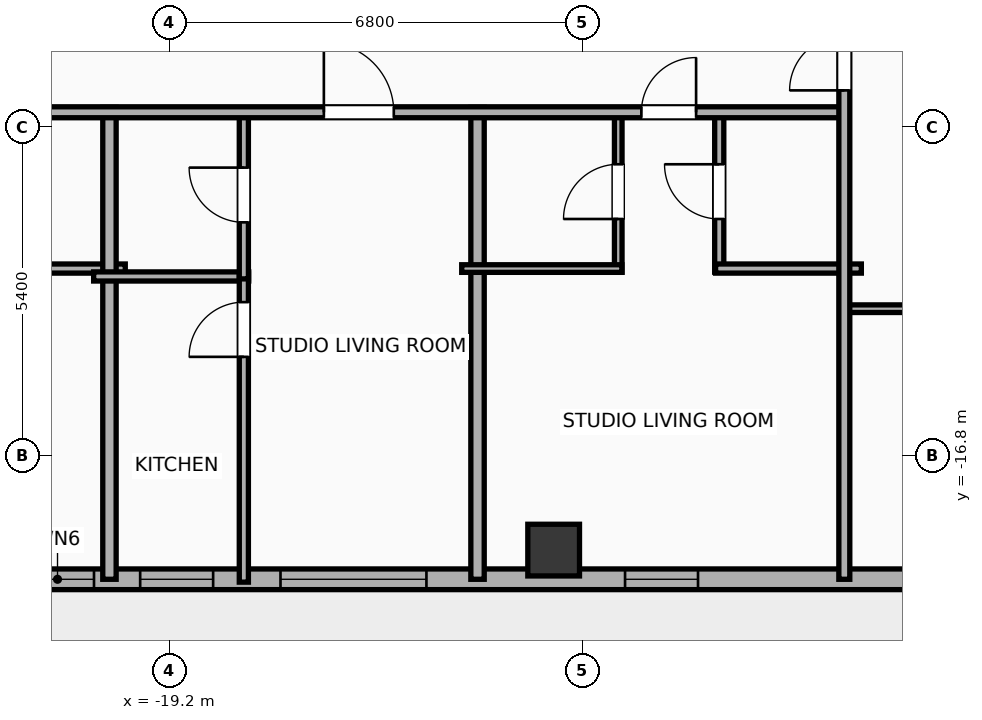
"""IFC4 building model, lengths in metres.
Left out: names, types, materials, properties, quantities, classifications, styles, units other than length and angle.
Written with IfcOpenShell. Run it as: python <this file> out.ifc"""

import sys

from ifc_helpers import new_model, si_unit, direction, frame, frame_2d, origin, origin_2d, place, context, subcontext, project, spatial, rectangle, hollow_rectangle, extrude, element, fill, save


model = new_model("IFC4")
c1 = context("Model", 3, precision=1e-05, world=origin(), true_north=direction((0.0, 1.0)))
c2 = subcontext(c1, "Body", "Model", "MODEL_VIEW")
j1 = project(units=[si_unit("LENGTHUNIT", "METRE"), si_unit("PLANEANGLEUNIT", "RADIAN")], contexts=[c1])
p1 = place(None, origin())
s1 = spatial("IfcSite", under=j1, at=p1, CompositionType="ELEMENT")
p2 = place(p1, origin())
s2 = spatial("IfcBuilding", under=s1, at=p2, CompositionType="ELEMENT")
p3 = place(p2, frame((0.0, 0.0, 231.4)))
s3 = spatial("IfcBuildingStorey", under=s2, at=p3, CompositionType="ELEMENT", Elevation=231.4)
p4 = place(p3, frame((-12.88, -18.35, 0.0), z_axis=(0.0, 0.0, 1.0), x_axis=(1.0, 0.0, 0.0)))
e1 = element("IfcColumn", 1, at=p4, inside=s3, PredefinedType="COLUMN", context=c2, shape_type="SweptSolid", body=[
    extrude(hollow_rectangle(XDim=0.85, YDim=0.85, WallThickness=0.028, at=origin_2d()), origin(), (0.0, 0.0, 1.0), 3.9),
])
p5 = place(p3, frame((26.783, -18.83, 0.0), z_axis=(0.0, 0.0, 1.0), x_axis=(-1.0, 0.0, 0.0)))
e2 = element("IfcWall", 2, at=p5, inside=s3, PredefinedType="ELEMENTEDWALL", context=c2, shape_type="SweptSolid", body=[
    extrude(rectangle(XDim=49.566, YDim=0.34, at=frame_2d((24.783, 0.0))), origin(), (0.0, 0.0, 1.0), 3.65),
])
p6 = place(p5, frame((23.583, 0.0, 0.75)))
e3 = element("IfcOpeningElement", 3, at=p6, cuts=e2, PredefinedType="OPENING", context=c2, shape_type="SweptSolid", body=[
    extrude(rectangle(XDim=2.4, YDim=2.1, at=frame_2d((1.2, 1.05))), frame((0.0, 0.18, 0.0), z_axis=(0.0, -1.0, 0.0), x_axis=(1.0, 0.0, 0.0)), (0.0, 0.0, 1.0), 0.36),
])
p7 = place(p5, frame((41.756, 0.0, 0.75)))
e4 = element("IfcOpeningElement", 4, at=p7, cuts=e2, PredefinedType="OPENING", context=c2, shape_type="SweptSolid", body=[
    extrude(rectangle(XDim=2.4, YDim=2.1, at=frame_2d((1.2, 1.05))), frame((0.0, 0.18, 0.0), z_axis=(0.0, -1.0, 0.0), x_axis=(1.0, 0.0, 0.0)), (0.0, 0.0, 1.0), 0.36),
])
p8 = place(p5, frame((47.222, 0.0, 0.75)))
e5 = element("IfcOpeningElement", 5, at=p8, cuts=e2, PredefinedType="OPENING", context=c2, shape_type="SweptSolid", body=[
    extrude(rectangle(XDim=1.2, YDim=2.05, at=frame_2d((0.6, 1.025))), frame((0.0, 0.18, 0.0), z_axis=(0.0, -1.0, 0.0), x_axis=(1.0, 0.0, 0.0)), (0.0, 0.0, 1.0), 0.36),
])
p9 = place(p5, frame((45.263, 0.0, 0.75)))
e6 = element("IfcOpeningElement", 6, at=p9, cuts=e2, PredefinedType="OPENING", context=c2, shape_type="SweptSolid", body=[
    extrude(rectangle(XDim=1.2, YDim=2.05, at=frame_2d((0.6, 1.025))), frame((0.0, 0.18, 0.0), z_axis=(0.0, -1.0, 0.0), x_axis=(1.0, 0.0, 0.0)), (0.0, 0.0, 1.0), 0.36),
])
p10 = place(p5, frame((37.289, 0.0, 0.75)))
e7 = element("IfcOpeningElement", 7, at=p10, cuts=e2, PredefinedType="OPENING", context=c2, shape_type="SweptSolid", body=[
    extrude(rectangle(XDim=1.2, YDim=2.05, at=frame_2d((0.6, 1.025))), frame((0.0, 0.18, 0.0), z_axis=(0.0, -1.0, 0.0), x_axis=(1.0, 0.0, 0.0)), (0.0, 0.0, 1.0), 0.36),
])
p11 = place(p5, frame((16.115, 0.0, 0.75)))
e8 = element("IfcOpeningElement", 8, at=p11, cuts=e2, PredefinedType="OPENING", context=c2, shape_type="SweptSolid", body=[
    extrude(rectangle(XDim=1.2, YDim=2.05, at=frame_2d((0.6, 1.025))), frame((0.0, 0.18, 0.0), z_axis=(0.0, -1.0, 0.0), x_axis=(1.0, 0.0, 0.0)), (0.0, 0.0, 1.0), 0.36),
])
p12 = place(p5, frame((12.422, 0.0, 0.75)))
e9 = element("IfcOpeningElement", 9, at=p12, cuts=e2, PredefinedType="OPENING", context=c2, shape_type="SweptSolid", body=[
    extrude(rectangle(XDim=1.2, YDim=2.05, at=frame_2d((0.6, 1.025))), frame((0.0, 0.18, 0.0), z_axis=(0.0, -1.0, 0.0), x_axis=(1.0, 0.0, 0.0)), (0.0, 0.0, 1.0), 0.36),
])
p13 = place(p5, frame((8.01, 0.0, 0.75)))
e10 = element("IfcOpeningElement", 10, at=p13, cuts=e2, PredefinedType="OPENING", context=c2, shape_type="SweptSolid", body=[
    extrude(rectangle(XDim=1.2, YDim=2.05, at=frame_2d((0.6, 1.025))), frame((0.0, 0.18, 0.0), z_axis=(0.0, -1.0, 0.0), x_axis=(1.0, 0.0, 0.0)), (0.0, 0.0, 1.0), 0.36),
])
p14 = place(p5, frame((5.037, 0.0, 0.75)))
e11 = element("IfcOpeningElement", 11, at=p14, cuts=e2, PredefinedType="OPENING", context=c2, shape_type="SweptSolid", body=[
    extrude(rectangle(XDim=1.2, YDim=2.05, at=frame_2d((0.6, 1.025))), frame((0.0, 0.18, 0.0), z_axis=(0.0, -1.0, 0.0), x_axis=(1.0, 0.0, 0.0)), (0.0, 0.0, 1.0), 0.36),
])
p15 = place(p5, frame((1.811, 0.0, 0.75)))
e12 = element("IfcOpeningElement", 12, at=p15, cuts=e2, PredefinedType="OPENING", context=c2, shape_type="SweptSolid", body=[
    extrude(rectangle(XDim=1.2, YDim=2.05, at=frame_2d((0.6, 1.025))), frame((0.0, 0.18, 0.0), z_axis=(0.0, -1.0, 0.0), x_axis=(1.0, 0.0, 0.0)), (0.0, 0.0, 1.0), 0.36),
])
p16 = place(p5, frame((32.253, 0.0, 0.75)))
e13 = element("IfcOpeningElement", 13, at=p16, cuts=e2, PredefinedType="OPENING", context=c2, shape_type="SweptSolid", body=[
    extrude(rectangle(XDim=1.2, YDim=2.05, at=frame_2d((0.6, 1.025))), frame((0.0, 0.18, 0.0), z_axis=(0.0, -1.0, 0.0), x_axis=(1.0, 0.0, 0.0)), (0.0, 0.0, 1.0), 0.36),
])
p17 = place(p5, frame((27.853, 0.0, 0.75)))
e14 = element("IfcOpeningElement", 14, at=p17, cuts=e2, PredefinedType="OPENING", context=c2, shape_type="SweptSolid", body=[
    extrude(rectangle(XDim=1.2, YDim=2.05, at=frame_2d((0.6, 1.025))), frame((0.0, 0.18, 0.0), z_axis=(0.0, -1.0, 0.0), x_axis=(1.0, 0.0, 0.0)), (0.0, 0.0, 1.0), 0.36),
])
p18 = place(p5, frame((20.473, 0.0, 0.75)))
e15 = element("IfcOpeningElement", 15, at=p18, cuts=e2, PredefinedType="OPENING", context=c2, shape_type="SweptSolid", body=[
    extrude(rectangle(XDim=1.2, YDim=2.05, at=frame_2d((0.6, 1.025))), frame((0.0, 0.18, 0.0), z_axis=(0.0, -1.0, 0.0), x_axis=(1.0, 0.0, 0.0)), (0.0, 0.0, 1.0), 0.36),
])
p19 = place(p3, frame((-22.342, -13.72, 0.0), z_axis=(0.0, 0.0, 1.0), x_axis=(1.0, 0.0, 0.0)))
e16 = element("IfcWall", 16, at=p19, inside=s3, PredefinedType="PLUMBINGWALL", context=c2, shape_type="SweptSolid", body=[
    extrude(rectangle(XDim=2.417, YDim=0.15, at=frame_2d((1.208, 0.0))), origin(), (0.0, 0.0, 1.0), 3.65),
])
p20 = place(p3, frame((-20.185, -18.83, 0.0), z_axis=(0.0, 0.0, 1.0), x_axis=(0.0, 1.0, 0.0)))
e17 = element("IfcWall", 17, at=p20, inside=s3, PredefinedType="PARTITIONING", context=c2, shape_type="SweptSolid", body=[
    extrude(rectangle(XDim=7.76, YDim=0.22, at=frame_2d((3.88, 0.0))), origin(), (0.0, 0.0, 1.0), 3.65),
])
p21 = place(p3, frame((-20.445, -13.85, 0.0), z_axis=(0.0, 0.0, 1.0), x_axis=(1.0, 0.0, 0.0)))
e18 = element("IfcWall", 18, at=p21, inside=s3, PredefinedType="PLUMBINGWALL", context=c2, shape_type="SweptSolid", body=[
    extrude(rectangle(XDim=2.55, YDim=0.15, at=frame_2d((1.275, 0.0))), origin(), (0.0, 0.0, 1.0), 3.65),
])
p22 = place(p3, frame((-17.975, -18.877, 0.0), z_axis=(0.0, 0.0, 1.0), x_axis=(0.0, 1.0, 0.0)))
e19 = element("IfcWall", 19, at=p22, inside=s3, PredefinedType="PLUMBINGWALL", context=c2, shape_type="SweptSolid", body=[
    extrude(rectangle(XDim=5.067, YDim=0.15, at=frame_2d((2.533, 0.0))), origin(), (0.0, 0.0, 1.0), 3.65),
])
p23 = place(p22, frame((3.705, 0.0, 0.0)))
e20 = element("IfcOpeningElement", 20, at=p23, cuts=e19, PredefinedType="OPENING", context=c2, shape_type="SweptSolid", body=[
    extrude(rectangle(XDim=0.9, YDim=2.05, at=frame_2d((0.45, 1.025))), frame((0.0, 0.085, 0.0), z_axis=(0.0, -1.0, 0.0), x_axis=(1.0, 0.0, 0.0)), (0.0, 0.0, 1.0), 0.17),
])
p24 = place(p3, frame((-17.975, -13.89, 0.0), z_axis=(0.0, 0.0, 1.0), x_axis=(0.0, 1.0, 0.0)))
e21 = element("IfcWall", 21, at=p24, inside=s3, PredefinedType="PLUMBINGWALL", context=c2, shape_type="SweptSolid", body=[
    extrude(rectangle(XDim=2.76, YDim=0.15, at=frame_2d((1.38, 0.0))), origin(), (0.0, 0.0, 1.0), 3.65),
])
p25 = place(p24, frame((0.93, 0.0, 0.0)))
e22 = element("IfcOpeningElement", 22, at=p25, cuts=e21, PredefinedType="OPENING", context=c2, shape_type="SweptSolid", body=[
    extrude(rectangle(XDim=0.9, YDim=2.05, at=frame_2d((0.45, 1.025))), frame((0.0, 0.085, 0.0), z_axis=(0.0, -1.0, 0.0), x_axis=(1.0, 0.0, 0.0)), (0.0, 0.0, 1.0), 0.17),
])
p26 = place(p3, frame((-14.132, -18.83, 0.0), z_axis=(0.0, 0.0, 1.0), x_axis=(0.0, 1.0, 0.0)))
e23 = element("IfcWall", 23, at=p26, inside=s3, PredefinedType="PARTITIONING", context=c2, shape_type="SweptSolid", body=[
    extrude(rectangle(XDim=7.76, YDim=0.22, at=frame_2d((3.88, 0.0))), origin(), (0.0, 0.0, 1.0), 3.65),
])
p27 = place(p3, frame((-11.818, -13.78, 0.0), z_axis=(0.0, 0.0, 1.0), x_axis=(0.0, 1.0, 0.0)))
e24 = element("IfcWall", 24, at=p27, inside=s3, PredefinedType="PARTITIONING", context=c2, shape_type="SweptSolid", body=[
    extrude(rectangle(XDim=2.65, YDim=0.125, at=frame_2d((1.325, 0.0))), origin(), (0.0, 0.0, 1.0), 3.65),
])
p28 = place(p27, frame((0.875, 0.0, 0.0)))
e25 = element("IfcOpeningElement", 25, at=p28, cuts=e24, PredefinedType="OPENING", context=c2, shape_type="SweptSolid", body=[
    extrude(rectangle(XDim=0.9, YDim=2.05, at=frame_2d((0.45, 1.025))), frame((0.0, 0.073, 0.0), z_axis=(0.0, -1.0, 0.0), x_axis=(1.0, 0.0, 0.0)), (0.0, 0.0, 1.0), 0.145),
])
p29 = place(p3, frame((-10.157, -13.78, 0.0), z_axis=(0.0, 0.0, 1.0), x_axis=(0.0, 1.0, 0.0)))
e26 = element("IfcWall", 26, at=p29, inside=s3, PredefinedType="PLUMBINGWALL", context=c2, shape_type="SweptSolid", body=[
    extrude(rectangle(XDim=2.65, YDim=0.15, at=frame_2d((1.325, 0.0))), origin(), (0.0, 0.0, 1.0), 3.65),
])
p30 = place(p29, frame((0.875, 0.0, 0.0)))
e27 = element("IfcOpeningElement", 27, at=p30, cuts=e26, PredefinedType="OPENING", context=c2, shape_type="SweptSolid", body=[
    extrude(rectangle(XDim=0.9, YDim=2.05, at=frame_2d((0.45, 1.025))), frame((0.0, 0.085, 0.0), z_axis=(0.0, -1.0, 0.0), x_axis=(1.0, 0.0, 0.0)), (0.0, 0.0, 1.0), 0.17),
])
p31 = place(p3, frame((-14.392, -13.72, 0.0), z_axis=(0.0, 0.0, 1.0), x_axis=(1.0, 0.0, 0.0)))
e28 = element("IfcWall", 28, at=p31, inside=s3, PredefinedType="PARTITIONING", context=c2, shape_type="SweptSolid", body=[
    extrude(rectangle(XDim=2.634, YDim=0.125, at=frame_2d((1.317, 0.0))), origin(), (0.0, 0.0, 1.0), 3.65),
])
p32 = place(p3, frame((-10.217, -13.72, 0.0), z_axis=(0.0, 0.0, 1.0), x_axis=(1.0, 0.0, 0.0)))
e29 = element("IfcWall", 29, at=p32, inside=s3, PredefinedType="PLUMBINGWALL", context=c2, shape_type="SweptSolid", body=[
    extrude(rectangle(XDim=2.397, YDim=0.15, at=frame_2d((1.198, 0.0))), origin(), (0.0, 0.0, 1.0), 3.65),
])
p33 = place(p3, frame((-26.23, -11.15, 0.0), z_axis=(0.0, 0.0, 1.0), x_axis=(1.0, 0.0, 0.0)))
e30 = element("IfcWall", 30, at=p33, inside=s3, PredefinedType="PARTITIONING", context=c2, shape_type="SweptSolid", body=[
    extrude(rectangle(XDim=18.15, YDim=0.18, at=frame_2d((9.075, 0.0))), origin(), (0.0, 0.0, 1.0), 3.65),
])
p34 = place(p33, frame((2.659, 0.0, 0.0)))
e31 = element("IfcOpeningElement", 31, at=p34, cuts=e30, PredefinedType="OPENING", context=c2, shape_type="SweptSolid", body=[
    extrude(rectangle(XDim=0.9, YDim=2.05, at=frame_2d((0.45, 1.025))), frame((0.0, 0.1, 0.0), z_axis=(0.0, -1.0, 0.0), x_axis=(1.0, 0.0, 0.0)), (0.0, 0.0, 1.0), 0.2),
])
p35 = place(p33, frame((9.571, 0.0, 0.0)))
e32 = element("IfcOpeningElement", 32, at=p35, cuts=e30, PredefinedType="OPENING", context=c2, shape_type="SweptSolid", body=[
    extrude(rectangle(XDim=1.15, YDim=2.05, at=frame_2d((0.575, 1.025))), frame((0.0, 0.1, 0.0), z_axis=(0.0, -1.0, 0.0), x_axis=(1.0, 0.0, 0.0)), (0.0, 0.0, 1.0), 0.2),
])
p36 = place(p33, frame((14.792, 0.0, 0.0)))
e33 = element("IfcOpeningElement", 33, at=p36, cuts=e30, PredefinedType="OPENING", context=c2, shape_type="SweptSolid", body=[
    extrude(rectangle(XDim=0.9, YDim=2.05, at=frame_2d((0.45, 1.025))), frame((0.0, 0.1, 0.0), z_axis=(0.0, -1.0, 0.0), x_axis=(1.0, 0.0, 0.0)), (0.0, 0.0, 1.0), 0.2),
])
p37 = place(p3, frame((-8.08, -14.38, 0.0), z_axis=(0.0, 0.0, 1.0), x_axis=(1.0, 0.0, 0.0)))
e34 = element("IfcWall", 34, at=p37, inside=s3, PredefinedType="PARTITIONING", context=c2, shape_type="SweptSolid", body=[
    extrude(rectangle(XDim=8.06, YDim=0.125, at=frame_2d((4.03, 0.0))), origin(), (0.0, 0.0, 1.0), 3.65),
])
p38 = place(p37, frame((1.323, 0.0, 0.0)))
e35 = element("IfcOpeningElement", 35, at=p38, cuts=e34, PredefinedType="OPENING", context=c2, shape_type="SweptSolid", body=[
    extrude(rectangle(XDim=0.9, YDim=2.05, at=frame_2d((0.45, 1.025))), frame((0.0, 0.073, 0.0), z_axis=(0.0, -1.0, 0.0), x_axis=(1.0, 0.0, 0.0)), (0.0, 0.0, 1.0), 0.145),
])
p39 = place(p37, frame((4.547, 0.0, 0.0)))
e36 = element("IfcOpeningElement", 36, at=p39, cuts=e34, PredefinedType="OPENING", context=c2, shape_type="SweptSolid", body=[
    extrude(rectangle(XDim=0.9, YDim=2.05, at=frame_2d((0.45, 1.025))), frame((0.0, 0.073, 0.0), z_axis=(0.0, -1.0, 0.0), x_axis=(1.0, 0.0, 0.0)), (0.0, 0.0, 1.0), 0.145),
])
p40 = place(p3, frame((-8.1, -18.83, 0.0), z_axis=(0.0, 0.0, 1.0), x_axis=(0.0, 1.0, 0.0)))
e37 = element("IfcWall", 37, at=p40, inside=s3, PredefinedType="PARTITIONING", context=c2, shape_type="SweptSolid", body=[
    extrude(rectangle(XDim=9.29, YDim=0.18, at=frame_2d((4.645, 0.0))), origin(), (0.0, 0.0, 1.0), 3.65),
])
p41 = place(p40, frame((8.04, 0.0, 0.0)))
e38 = element("IfcOpeningElement", 38, at=p41, cuts=e37, PredefinedType="OPENING", context=c2, shape_type="SweptSolid", body=[
    extrude(rectangle(XDim=0.9, YDim=2.05, at=frame_2d((0.45, 1.025))), frame((0.0, 0.1, 0.0), z_axis=(0.0, -1.0, 0.0), x_axis=(1.0, 0.0, 0.0)), (0.0, 0.0, 1.0), 0.2),
])
p42 = place(p7, origin())
e39 = element("IfcWindow", 39, at=p42, inside=s3, PartitioningType="SINGLE_PANEL", PredefinedType="WINDOW", context=c2, shape_type="SweptSolid", body=[
    extrude(rectangle(XDim=2.4, YDim=2.1, at=frame_2d((1.2, 1.05))), frame((0.0, 0.03, 0.0), z_axis=(0.0, -1.0, 0.0), x_axis=(1.0, 0.0, 0.0)), (0.0, 0.0, 1.0), 0.06),
])
fill(e4, e39)
p43 = place(p8, origin())
e40 = element("IfcWindow", 40, at=p43, inside=s3, PartitioningType="SINGLE_PANEL", PredefinedType="WINDOW", context=c2, shape_type="SweptSolid", body=[
    extrude(rectangle(XDim=1.2, YDim=2.05, at=frame_2d((0.6, 1.025))), frame((0.0, 0.03, 0.0), z_axis=(0.0, -1.0, 0.0), x_axis=(1.0, 0.0, 0.0)), (0.0, 0.0, 1.0), 0.06),
])
fill(e5, e40)
p44 = place(p9, origin())
e41 = element("IfcWindow", 41, at=p44, inside=s3, PartitioningType="SINGLE_PANEL", PredefinedType="WINDOW", context=c2, shape_type="SweptSolid", body=[
    extrude(rectangle(XDim=1.2, YDim=2.05, at=frame_2d((0.6, 1.025))), frame((0.0, 0.03, 0.0), z_axis=(0.0, -1.0, 0.0), x_axis=(1.0, 0.0, 0.0)), (0.0, 0.0, 1.0), 0.06),
])
fill(e6, e41)
p45 = place(p10, origin())
e42 = element("IfcWindow", 42, at=p45, inside=s3, PartitioningType="SINGLE_PANEL", PredefinedType="WINDOW", context=c2, shape_type="SweptSolid", body=[
    extrude(rectangle(XDim=1.2, YDim=2.05, at=frame_2d((0.6, 1.025))), frame((0.0, 0.03, 0.0), z_axis=(0.0, -1.0, 0.0), x_axis=(1.0, 0.0, 0.0)), (0.0, 0.0, 1.0), 0.06),
])
fill(e7, e42)
p46 = place(p23, origin())
e43 = element("IfcDoor", 43, at=p46, inside=s3, OperationType="SINGLE_SWING_LEFT", PredefinedType="DOOR", context=c2, shape_type="SweptSolid", body=[
    extrude(rectangle(XDim=0.9, YDim=2.05, at=frame_2d((0.45, 1.025))), frame((0.0, 0.025, 0.0), z_axis=(0.0, -1.0, 0.0), x_axis=(1.0, 0.0, 0.0)), (0.0, 0.0, 1.0), 0.05),
])
fill(e20, e43)
p47 = place(p25, origin())
e44 = element("IfcDoor", 44, at=p47, inside=s3, OperationType="SINGLE_SWING_RIGHT", PredefinedType="DOOR", context=c2, shape_type="SweptSolid", body=[
    extrude(rectangle(XDim=0.9, YDim=2.05, at=frame_2d((0.45, 1.025))), frame((0.0, 0.025, 0.0), z_axis=(0.0, -1.0, 0.0), x_axis=(1.0, 0.0, 0.0)), (0.0, 0.0, 1.0), 0.05),
])
fill(e22, e44)
p48 = place(p28, origin())
e45 = element("IfcDoor", 45, at=p48, inside=s3, OperationType="SINGLE_SWING_LEFT", PredefinedType="DOOR", context=c2, shape_type="SweptSolid", body=[
    extrude(rectangle(XDim=0.9, YDim=2.05, at=frame_2d((0.45, 1.025))), frame((0.0, 0.025, 0.0), z_axis=(0.0, -1.0, 0.0), x_axis=(1.0, 0.0, 0.0)), (0.0, 0.0, 1.0), 0.05),
])
fill(e25, e45)
p49 = place(p30, origin())
e46 = element("IfcDoor", 46, at=p49, inside=s3, OperationType="SINGLE_SWING_RIGHT", PredefinedType="DOOR", context=c2, shape_type="SweptSolid", body=[
    extrude(rectangle(XDim=0.9, YDim=2.05, at=frame_2d((0.45, 1.025))), frame((0.0, 0.025, 0.0), z_axis=(0.0, -1.0, 0.0), x_axis=(1.0, 0.0, 0.0)), (0.0, 0.0, 1.0), 0.05),
])
fill(e27, e46)
p50 = place(p35, origin())
e47 = element("IfcDoor", 47, at=p50, inside=s3, OperationType="SINGLE_SWING_LEFT", PredefinedType="DOOR", context=c2, shape_type="SweptSolid", body=[
    extrude(rectangle(XDim=1.15, YDim=2.05, at=frame_2d((0.575, 1.025))), frame((0.0, 0.025, 0.0), z_axis=(0.0, -1.0, 0.0), x_axis=(1.0, 0.0, 0.0)), (0.0, 0.0, 1.0), 0.05),
])
fill(e32, e47)
p51 = place(p36, origin())
e48 = element("IfcDoor", 48, at=p51, inside=s3, OperationType="SINGLE_SWING_RIGHT", PredefinedType="DOOR", context=c2, shape_type="SweptSolid", body=[
    extrude(rectangle(XDim=0.9, YDim=2.05, at=frame_2d((0.45, 1.025))), frame((0.0, 0.025, 0.0), z_axis=(0.0, -1.0, 0.0), x_axis=(1.0, 0.0, 0.0)), (0.0, 0.0, 1.0), 0.05),
])
fill(e33, e48)
p52 = place(p41, origin())
e49 = element("IfcDoor", 49, at=p52, inside=s3, OperationType="SINGLE_SWING_LEFT", PredefinedType="DOOR", context=c2, shape_type="SweptSolid", body=[
    extrude(rectangle(XDim=0.9, YDim=2.05, at=frame_2d((0.45, 1.025))), frame((0.0, 0.025, 0.0), z_axis=(0.0, -1.0, 0.0), x_axis=(1.0, 0.0, 0.0)), (0.0, 0.0, 1.0), 0.05),
])
fill(e38, e49)
save(model, sys.argv[1])
